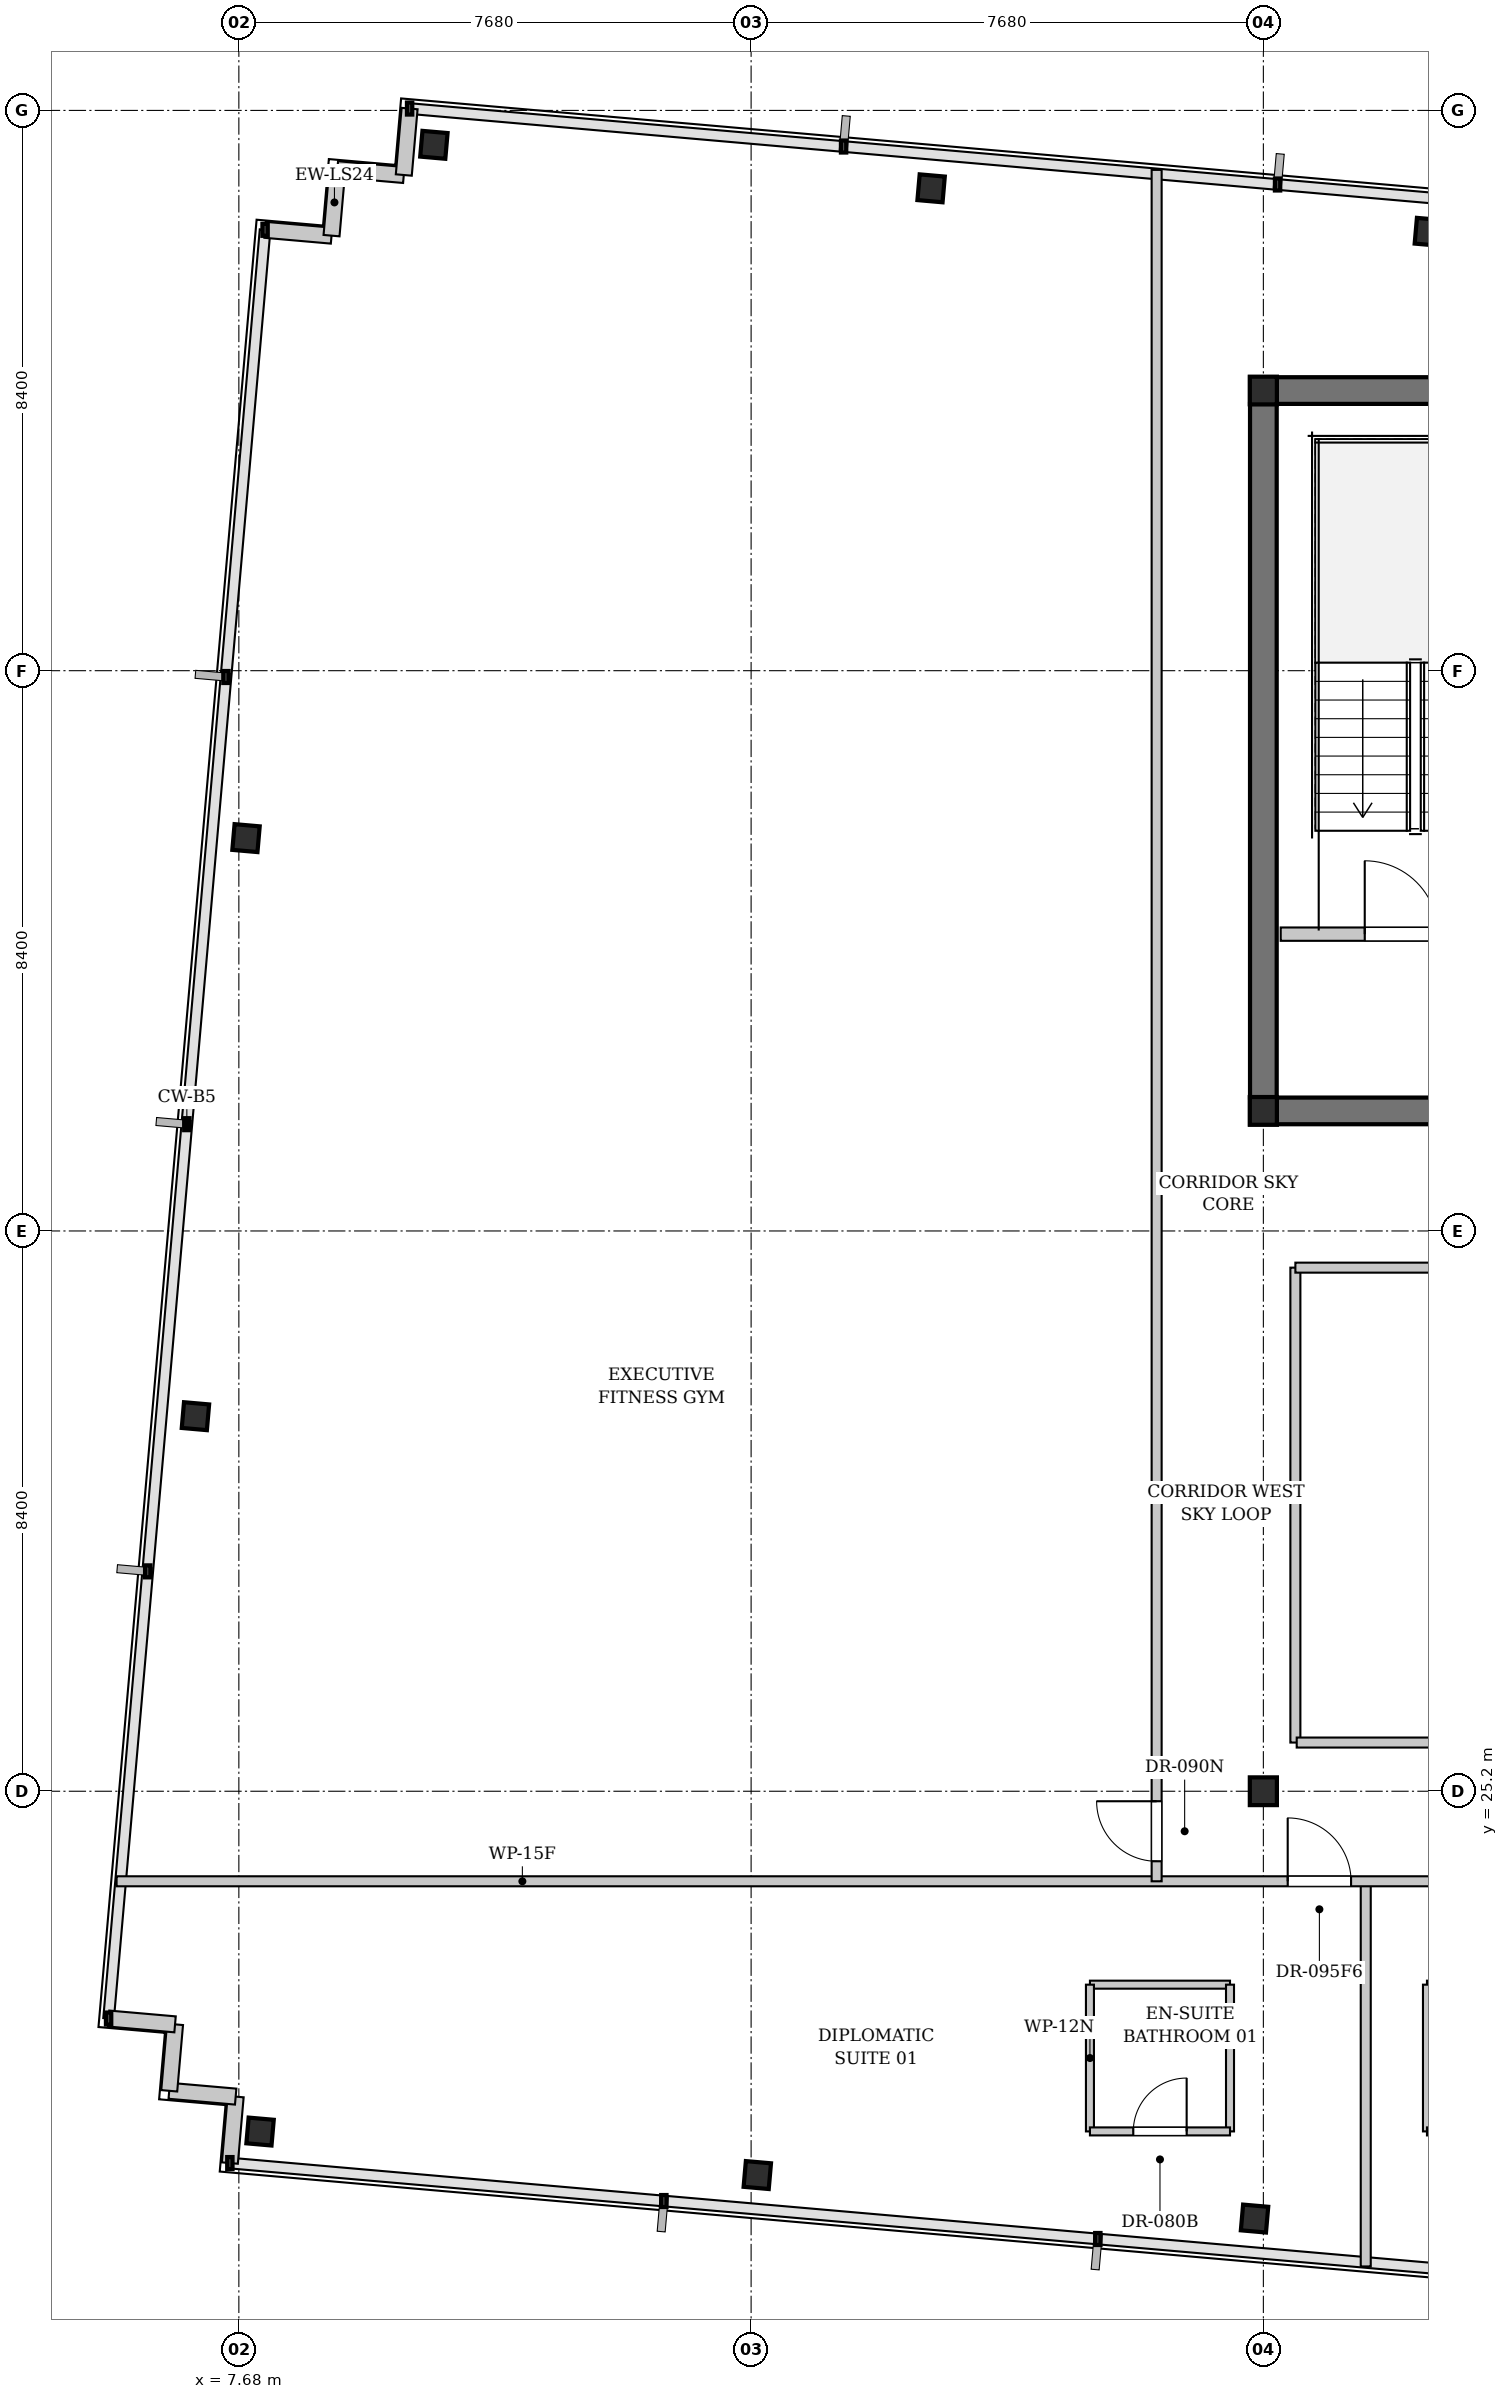
"""IFC4 building model, lengths in metres.
Left out: names, types, materials, properties, quantities, classifications, styles, units other than length and angle.
Written with IfcOpenShell. Run it as: python <this file> out.ifc"""

import sys

from ifc_helpers import new_model, si_unit, direction, frame, frame_2d, origin, origin_2d, place, context, subcontext, project, spatial, rectangle, i_section, extrude, element, fill, save


model = new_model("IFC4")
c1 = context("Model", 3, precision=1e-05, world=origin(), true_north=direction((0.0, 1.0)))
c2 = subcontext(c1, "Body", "Model", "MODEL_VIEW")
j1 = project(units=[si_unit("LENGTHUNIT", "METRE"), si_unit("PLANEANGLEUNIT", "RADIAN")], contexts=[c1])
p1 = place(None, origin())
s1 = spatial("IfcSite", under=j1, at=p1, CompositionType="ELEMENT")
p2 = place(p1, origin())
s2 = spatial("IfcBuilding", under=s1, at=p2, CompositionType="ELEMENT")
p3 = place(p2, frame((0.0, 0.0, 282.9)))
s3 = spatial("IfcBuildingStorey", under=s2, at=p3, CompositionType="ELEMENT", Elevation=282.9)
p4 = place(p3, frame((22.84, 46.2, 0.0), z_axis=(0.0, 0.0, 1.0), x_axis=(1.0, 0.0, 0.0)))
e1 = element("IfcWall", 1, at=p4, inside=s3, PredefinedType="SHEAR", context=c2, shape_type="SweptSolid", body=[
    extrude(rectangle(XDim=31.12, YDim=0.4, at=frame_2d((15.56, 0.0))), origin(), (0.0, 0.0, 1.0), 3.18),
])
p5 = place(p3, frame((22.84, 35.4, 0.0), z_axis=(0.0, 0.0, 1.0), x_axis=(1.0, 0.0, 0.0)))
e2 = element("IfcWall", 2, at=p5, inside=s3, PredefinedType="SHEAR", context=c2, shape_type="SweptSolid", body=[
    extrude(rectangle(XDim=5.36, YDim=0.4, at=frame_2d((2.68, 0.0))), origin(), (0.0, 0.0, 1.0), 3.18),
])
p6 = place(p3, frame((23.04, 35.6, 0.0), z_axis=(0.0, 0.0, 1.0), x_axis=(0.0, 1.0, 0.0)))
e3 = element("IfcWall", 3, at=p6, inside=s3, PredefinedType="SHEAR", context=c2, shape_type="SweptSolid", body=[
    extrude(rectangle(XDim=10.4, YDim=0.4, at=frame_2d((5.2, 0.0))), origin(), (0.0, 0.0, 1.0), 3.18),
])
for number, where, z_axis, x_axis in (
    (4, (23.04, 35.4, 0.0), (0.0, 0.0, 1.0), (1.0, 0.0, 0.0)),
    (5, (23.04, 46.2, 0.0), (0.0, 0.0, 1.0), (1.0, 0.0, 0.0)),
    (6, (23.04, 25.2, 0.0), (0.0, 0.0, 1.0), (1.0, 0.0, 0.0)),
):
    element("IfcColumn", number, at=place(p3, frame(where, z_axis=z_axis, x_axis=x_axis)), inside=s3, PredefinedType="COLUMN", context=c2, shape_type="SweptSolid", body=[
        extrude(i_section(OverallWidth=0.406, OverallDepth=0.416, WebThickness=0.03, FlangeThickness=0.048, FilletRadius=0.015, at=origin_2d()), origin(), (0.0, 0.0, 1.0), 3.4),
    ])
for number, where, z_axis, x_axis in (
    (7, (7.998, 20.098, 0.0), (0.0, 0.0, 1.0), (0.996, -0.087, 0.0)),
    (8, (15.453, 19.446, 0.0), (0.0, 0.0, 1.0), (0.996, -0.087, 0.0)),
    (9, (22.908, 18.793, 0.0), (0.0, 0.0, 1.0), (0.996, -0.087, 0.0)),
    (10, (10.604, 49.884, 0.0), (0.0, 0.0, 1.0), (0.996, -0.087, 0.0)),
    (11, (18.059, 49.232, 0.0), (0.0, 0.0, 1.0), (0.996, -0.087, 0.0)),
    (12, (25.514, 48.58, 0.0), (0.0, 0.0, 1.0), (0.996, -0.087, 0.0)),
    (13, (7.029, 30.823, 0.0), (0.0, 0.0, 1.0), (0.996, -0.087, 0.0)),
    (14, (7.787, 39.49, 0.0), (0.0, 0.0, 1.0), (0.996, -0.087, 0.0)),
):
    element("IfcColumn", number, at=place(p3, frame(where, z_axis=z_axis, x_axis=x_axis)), inside=s3, PredefinedType="COLUMN", context=c2, shape_type="SweptSolid", body=[
        extrude(i_section(OverallWidth=0.378, OverallDepth=0.387, WebThickness=0.021, FlangeThickness=0.033, FilletRadius=0.015, at=origin_2d()), origin(), (0.0, 0.0, 1.0), 3.4),
    ])
for number, where, z_axis, x_axis in (
    (15, (7.545, 19.625, 0.0), (0.0, 0.0, 1.0), (0.087, 0.996, 0.0)),
    (16, (7.632, 20.622, 0.0), (0.0, 0.0, 1.0), (-0.996, 0.087, 0.0)),
):
    element("IfcWall", number, at=place(p3, frame(where, z_axis=z_axis, x_axis=x_axis)), inside=s3, PredefinedType="SOLIDWALL", context=c2, shape_type="SweptSolid", body=[
        extrude(rectangle(XDim=1.0, YDim=0.24, at=frame_2d((0.5, 0.0))), origin(), (0.0, 0.0, 1.0), 3.18),
    ])
for number, where, z_axis, x_axis in (
    (17, (6.636, 20.709, 0.0), (0.0, 0.0, 1.0), (0.087, 0.996, 0.0)),
    (18, (6.723, 21.705, 0.0), (0.0, 0.0, 1.0), (-0.996, 0.087, 0.0)),
    (19, (8.073, 48.61, 0.0), (0.0, 0.0, 1.0), (0.996, -0.087, 0.0)),
    (20, (9.07, 48.522, 0.0), (0.0, 0.0, 1.0), (0.087, 0.996, 0.0)),
):
    element("IfcWall", number, at=place(p3, frame(where, z_axis=z_axis, x_axis=x_axis)), inside=s3, PredefinedType="SOLIDWALL", context=c2, shape_type="SweptSolid", body=[
        extrude(rectangle(XDim=1.0, YDim=0.24, at=frame_2d((0.5, 0.0))), origin(), (0.0, 0.0, 1.0), 3.18),
    ])
for number, where, z_axis, x_axis in (
    (21, (9.157, 49.519, 0.0), (0.0, 0.0, 1.0), (0.996, -0.087, 0.0)),
    (22, (10.153, 49.432, 0.0), (0.0, 0.0, 1.0), (0.087, 0.996, 0.0)),
):
    element("IfcWall", number, at=place(p3, frame(where, z_axis=z_axis, x_axis=x_axis)), inside=s3, PredefinedType="SOLIDWALL", context=c2, shape_type="SweptSolid", body=[
        extrude(rectangle(XDim=1.0, YDim=0.24, at=frame_2d((0.5, 0.0))), origin(), (0.0, 0.0, 1.0), 3.18),
    ])
p7 = place(p3, frame((23.3, 38.05, 0.0), z_axis=(0.0, 0.0, 1.0), x_axis=(1.0, 0.0, 0.0)))
e23 = element("IfcWall", 23, at=p7, inside=s3, PredefinedType="PARTITIONING", context=c2, shape_type="SweptSolid", body=[
    extrude(rectangle(XDim=3.62, YDim=0.2, at=frame_2d((1.81, 0.0))), origin(), (0.0, 0.0, 1.0), 3.18),
])
p8 = place(p7, frame((1.26, 0.0, 0.0)))
e24 = element("IfcOpeningElement", 24, at=p8, cuts=e23, PredefinedType="OPENING", context=c2, shape_type="SweptSolid", body=[
    extrude(rectangle(XDim=1.1, YDim=2.15, at=frame_2d((0.55, 1.075))), frame((0.0, 0.11, 0.0), z_axis=(0.0, -1.0, 0.0), x_axis=(1.0, 0.0, 0.0)), (0.0, 0.0, 1.0), 0.22),
])
p9 = place(p3, frame((20.44, 22.3, 0.0), z_axis=(0.0, 0.0, 1.0), x_axis=(1.0, 0.0, 0.0)))
e25 = element("IfcWall", 25, at=p9, inside=s3, PredefinedType="PARTITIONING", context=c2, shape_type="SweptSolid", body=[
    extrude(rectangle(XDim=2.1, YDim=0.12, at=frame_2d((1.05, 0.0))), origin(), (0.0, 0.0, 1.0), 3.18),
])
for number, where, z_axis, x_axis in (
    (26, (20.44, 20.1, 0.0), (0.0, 0.0, 1.0), (0.0, 1.0, 0.0)),
    (27, (22.54, 20.1, 0.0), (0.0, 0.0, 1.0), (0.0, 1.0, 0.0)),
):
    element("IfcWall", number, at=place(p3, frame(where, z_axis=z_axis, x_axis=x_axis)), inside=s3, PredefinedType="PARTITIONING", context=c2, shape_type="SweptSolid", body=[
        extrude(rectangle(XDim=2.2, YDim=0.12, at=frame_2d((1.1, 0.0))), origin(), (0.0, 0.0, 1.0), 3.18),
    ])
p10 = place(p3, frame((20.44, 20.1, 0.0), z_axis=(0.0, 0.0, 1.0), x_axis=(1.0, 0.0, 0.0)))
e28 = element("IfcWall", 28, at=p10, inside=s3, PredefinedType="PARTITIONING", context=c2, shape_type="SweptSolid", body=[
    extrude(rectangle(XDim=2.1, YDim=0.12, at=frame_2d((1.05, 0.0))), origin(), (0.0, 0.0, 1.0), 3.18),
])
p11 = place(p10, frame((0.65, 0.0, 0.0)))
e29 = element("IfcOpeningElement", 29, at=p11, cuts=e28, PredefinedType="OPENING", context=c2, shape_type="SweptSolid", body=[
    extrude(rectangle(XDim=0.8, YDim=2.1, at=frame_2d((0.4, 1.05))), frame((0.0, 0.07, 0.0), z_axis=(0.0, -1.0, 0.0), x_axis=(1.0, 0.0, 0.0)), (0.0, 0.0, 1.0), 0.14),
])
p12 = place(p3, frame((25.493, 22.3, 0.0), z_axis=(0.0, 0.0, 1.0), x_axis=(1.0, 0.0, 0.0)))
e30 = element("IfcWall", 30, at=p12, inside=s3, PredefinedType="PARTITIONING", context=c2, shape_type="SweptSolid", body=[
    extrude(rectangle(XDim=2.1, YDim=0.12, at=frame_2d((1.05, 0.0))), origin(), (0.0, 0.0, 1.0), 3.18),
])
p13 = place(p3, frame((25.493, 20.1, 0.0), z_axis=(0.0, 0.0, 1.0), x_axis=(0.0, 1.0, 0.0)))
e31 = element("IfcWall", 31, at=p13, inside=s3, PredefinedType="PARTITIONING", context=c2, shape_type="SweptSolid", body=[
    extrude(rectangle(XDim=2.2, YDim=0.12, at=frame_2d((1.1, 0.0))), origin(), (0.0, 0.0, 1.0), 3.18),
])
p14 = place(p3, frame((25.493, 20.1, 0.0), z_axis=(0.0, 0.0, 1.0), x_axis=(1.0, 0.0, 0.0)))
e32 = element("IfcWall", 32, at=p14, inside=s3, PredefinedType="PARTITIONING", context=c2, shape_type="SweptSolid", body=[
    extrude(rectangle(XDim=2.1, YDim=0.12, at=frame_2d((1.05, 0.0))), origin(), (0.0, 0.0, 1.0), 3.18),
])
p15 = place(p14, frame((0.65, 0.0, 0.0)))
e33 = element("IfcOpeningElement", 33, at=p15, cuts=e32, PredefinedType="OPENING", context=c2, shape_type="SweptSolid", body=[
    extrude(rectangle(XDim=0.8, YDim=2.1, at=frame_2d((0.4, 1.05))), frame((0.0, 0.07, 0.0), z_axis=(0.0, -1.0, 0.0), x_axis=(1.0, 0.0, 0.0)), (0.0, 0.0, 1.0), 0.14),
])
p16 = place(p3, frame((24.575, 18.075, 0.0), z_axis=(0.0, 0.0, 1.0), x_axis=(0.0, 1.0, 0.0)))
e34 = element("IfcWall", 34, at=p16, inside=s3, PredefinedType="PARTITIONING", context=c2, shape_type="SweptSolid", body=[
    extrude(rectangle(XDim=5.795, YDim=0.15, at=frame_2d((2.897, 0.0))), origin(), (0.0, 0.0, 1.0), 3.18),
])
p17 = place(p3, frame((5.847, 23.85, 0.0), z_axis=(0.0, 0.0, 1.0), x_axis=(1.0, 0.0, 0.0)))
e35 = element("IfcWall", 35, at=p17, inside=s3, PredefinedType="PARTITIONING", context=c2, shape_type="SweptSolid", body=[
    extrude(rectangle(XDim=27.653, YDim=0.15, at=frame_2d((13.827, 0.0))), origin(), (0.0, 0.0, 1.0), 2.575),
])
p18 = place(p17, frame((17.558, 0.0, 0.0)))
e36 = element("IfcOpeningElement", 36, at=p18, cuts=e35, PredefinedType="OPENING", context=c2, shape_type="SweptSolid", body=[
    extrude(rectangle(XDim=0.95, YDim=2.15, at=frame_2d((0.475, 1.075))), frame((0.0, 0.085, 0.0), z_axis=(0.0, -1.0, 0.0), x_axis=(1.0, 0.0, 0.0)), (0.0, 0.0, 1.0), 0.17),
])
p19 = place(p17, frame((20.336, 0.0, 0.0)))
e37 = element("IfcOpeningElement", 37, at=p19, cuts=e35, PredefinedType="OPENING", context=c2, shape_type="SweptSolid", body=[
    extrude(rectangle(XDim=0.95, YDim=2.15, at=frame_2d((0.475, 1.075))), frame((0.0, 0.085, 0.0), z_axis=(0.0, -1.0, 0.0), x_axis=(1.0, 0.0, 0.0)), (0.0, 0.0, 1.0), 0.17),
])
p20 = place(p17, frame((26.473, 0.0, 0.0)))
e38 = element("IfcOpeningElement", 38, at=p20, cuts=e35, PredefinedType="OPENING", context=c2, shape_type="SweptSolid", body=[
    extrude(rectangle(XDim=0.95, YDim=2.15, at=frame_2d((0.475, 1.075))), frame((0.0, 0.085, 0.0), z_axis=(0.0, -1.0, 0.0), x_axis=(1.0, 0.0, 0.0)), (0.0, 0.0, 1.0), 0.17),
])
p21 = place(p3, frame((21.44, 23.85, 0.0), z_axis=(0.0, 0.0, 1.0), x_axis=(0.0, 1.0, 0.0)))
e39 = element("IfcWall", 39, at=p21, inside=s3, PredefinedType="PARTITIONING", context=c2, shape_type="SweptSolid", body=[
    extrude(rectangle(XDim=25.658, YDim=0.15, at=frame_2d((12.829, 0.0))), origin(), (0.0, 0.0, 1.0), 2.575),
])
p22 = place(p21, frame((0.3, 0.0, 0.0)))
e40 = element("IfcOpeningElement", 40, at=p22, cuts=e39, PredefinedType="OPENING", context=c2, shape_type="SweptSolid", body=[
    extrude(rectangle(XDim=0.9, YDim=2.15, at=frame_2d((0.45, 1.075))), frame((0.0, 0.085, 0.0), z_axis=(0.0, -1.0, 0.0), x_axis=(1.0, 0.0, 0.0)), (0.0, 0.0, 1.0), 0.17),
])
p23 = place(p3, frame((23.52, 25.93, 0.0), z_axis=(0.0, 0.0, 1.0), x_axis=(0.0, 1.0, 0.0)))
e41 = element("IfcWall", 41, at=p23, inside=s3, PredefinedType="PARTITIONING", context=c2, shape_type="SweptSolid", body=[
    extrude(rectangle(XDim=7.12, YDim=0.15, at=frame_2d((3.56, 0.0))), origin(), (0.0, 0.0, 1.0), 3.18),
])
p24 = place(p3, frame((23.52, 33.05, 0.0), z_axis=(0.0, 0.0, 1.0), x_axis=(1.0, 0.0, 0.0)))
e42 = element("IfcWall", 42, at=p24, inside=s3, PredefinedType="PARTITIONING", context=c2, shape_type="SweptSolid", body=[
    extrude(rectangle(XDim=9.98, YDim=0.15, at=frame_2d((4.99, 0.0))), origin(), (0.0, 0.0, 1.0), 3.18),
])
p25 = place(p3, frame((23.54, 25.93, 0.0), z_axis=(0.0, 0.0, 1.0), x_axis=(1.0, 0.0, 0.0)))
e43 = element("IfcWall", 43, at=p25, inside=s3, PredefinedType="PARTITIONING", context=c2, shape_type="SweptSolid", body=[
    extrude(rectangle(XDim=9.95, YDim=0.15, at=frame_2d((4.975, 0.0))), origin(), (0.0, 0.0, 1.0), 3.18),
])
p26 = place(p25, frame((4.525, 0.0, 0.0)))
e44 = element("IfcOpeningElement", 44, at=p26, cuts=e43, PredefinedType="OPENING", context=c2, shape_type="SweptSolid", body=[
    extrude(rectangle(XDim=0.9, YDim=2.15, at=frame_2d((0.45, 1.075))), frame((0.0, 0.085, 0.0), z_axis=(0.0, -1.0, 0.0), x_axis=(1.0, 0.0, 0.0)), (0.0, 0.0, 1.0), 0.17),
])
p27 = place(p8, origin())
e45 = element("IfcDoor", 45, at=p27, inside=s3, OperationType="SINGLE_SWING_LEFT", PredefinedType="DOOR", context=c2, shape_type="SweptSolid", body=[
    extrude(rectangle(XDim=1.1, YDim=2.15, at=frame_2d((0.55, 1.075))), frame((0.0, 0.025, 0.0), z_axis=(0.0, -1.0, 0.0), x_axis=(1.0, 0.0, 0.0)), (0.0, 0.0, 1.0), 0.05),
])
fill(e24, e45)
p28 = place(p11, origin())
e46 = element("IfcDoor", 46, at=p28, inside=s3, OperationType="SINGLE_SWING_RIGHT", PredefinedType="DOOR", context=c2, shape_type="SweptSolid", body=[
    extrude(rectangle(XDim=0.8, YDim=2.1, at=frame_2d((0.4, 1.05))), frame((0.0, 0.025, 0.0), z_axis=(0.0, -1.0, 0.0), x_axis=(1.0, 0.0, 0.0)), (0.0, 0.0, 1.0), 0.05),
])
fill(e29, e46)
p29 = place(p18, origin())
e47 = element("IfcDoor", 47, at=p29, inside=s3, OperationType="SINGLE_SWING_LEFT", PredefinedType="DOOR", context=c2, shape_type="SweptSolid", body=[
    extrude(rectangle(XDim=0.95, YDim=2.15, at=frame_2d((0.475, 1.075))), frame((0.0, 0.025, 0.0), z_axis=(0.0, -1.0, 0.0), x_axis=(1.0, 0.0, 0.0)), (0.0, 0.0, 1.0), 0.05),
])
fill(e36, e47)
p30 = place(p22, origin())
e48 = element("IfcDoor", 48, at=p30, inside=s3, OperationType="SINGLE_SWING_RIGHT", PredefinedType="DOOR", context=c2, shape_type="SweptSolid", body=[
    extrude(rectangle(XDim=0.9, YDim=2.15, at=frame_2d((0.45, 1.075))), frame((0.0, 0.025, 0.0), z_axis=(0.0, -1.0, 0.0), x_axis=(1.0, 0.0, 0.0)), (0.0, 0.0, 1.0), 0.05),
])
fill(e40, e48)
save(model, sys.argv[1])
